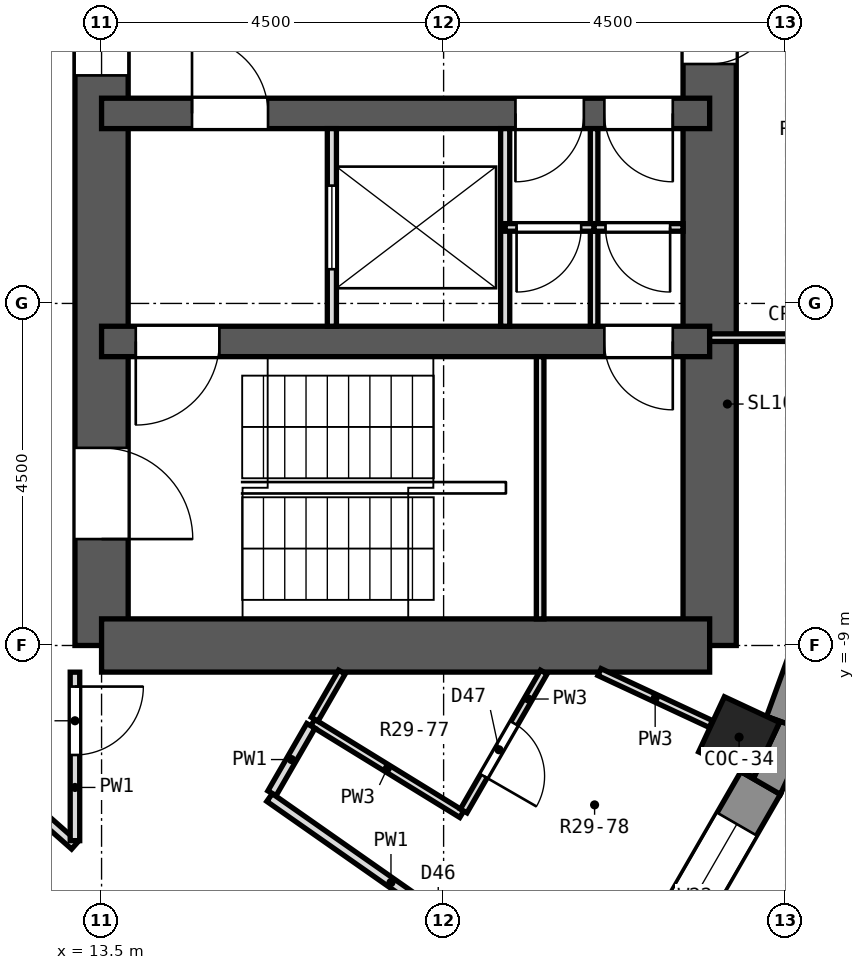
"""IFC4 building model, lengths in metres.
Left out: names, types, materials, properties, quantities, classifications, styles, units other than length and angle.
Written with IfcOpenShell. Run it as: python <this file> out.ifc"""

import sys

from ifc_helpers import new_model, si_unit, direction, frame, frame_2d, origin, origin_2d, place, context, subcontext, project, spatial, polyline, rectangle, outline, extrude, element, fill, save


model = new_model("IFC4")
c1 = context("Model", 3, precision=1e-05, world=origin(), true_north=direction((0.0, 1.0)))
c2 = subcontext(c1, "Body", "Model", "MODEL_VIEW")
j1 = project(units=[si_unit("LENGTHUNIT", "METRE"), si_unit("PLANEANGLEUNIT", "RADIAN")], contexts=[c1])
p1 = place(None, origin())
s1 = spatial("IfcSite", under=j1, at=p1, CompositionType="ELEMENT")
p2 = place(p1, origin())
s2 = spatial("IfcBuilding", under=s1, at=p2, CompositionType="ELEMENT")
p3 = place(p2, frame((0.0, 0.0, 200.4)))
s3 = spatial("IfcBuildingStorey", under=s2, at=p3, CompositionType="ELEMENT", Elevation=200.4)
p4 = place(p3, frame((21.887, -10.206, 0.0), z_axis=(0.0, 0.0, 1.0), x_axis=(0.906307787037, -0.422618261741, 0.0)))
e1 = element("IfcColumn", 1, at=p4, inside=s3, PredefinedType="COLUMN", context=c2, shape_type="SweptSolid", body=[
    extrude(rectangle(XDim=0.8, YDim=0.8, at=origin_2d()), origin(), (0.0, 0.0, 1.0), 3.3),
])
p5 = place(p3, frame((13.5, -9.0, 0.0), z_axis=(0.0, 0.0, 1.0), x_axis=(0.0, 1.0, 0.0)))
e2 = element("IfcWall", 2, at=p5, inside=s3, PredefinedType="SHEAR", context=c2, shape_type="SweptSolid", body=[
    extrude(rectangle(XDim=18.0, YDim=0.7, at=frame_2d((9.0, 0.0))), origin(), (0.0, 0.0, 1.0), 3.3),
])
p6 = place(p5, frame((15.4, 0.0, 0.0)))
e3 = element("IfcOpeningElement", 3, at=p6, cuts=e2, PredefinedType="OPENING", context=c2, shape_type="SweptSolid", body=[
    extrude(rectangle(XDim=1.2, YDim=2.1, at=frame_2d((0.6, 1.05))), frame((0.0, 0.362, 0.0), z_axis=(0.0, -1.0, 0.0), x_axis=(1.0, 0.0, 0.0)), (0.0, 0.0, 1.0), 0.724),
])
p7 = place(p5, frame((1.4, 0.0, 0.0)))
e4 = element("IfcOpeningElement", 4, at=p7, cuts=e2, PredefinedType="OPENING", context=c2, shape_type="SweptSolid", body=[
    extrude(rectangle(XDim=1.2, YDim=2.1, at=frame_2d((0.6, 1.05))), frame((0.0, 0.362, 0.0), z_axis=(0.0, -1.0, 0.0), x_axis=(1.0, 0.0, 0.0)), (0.0, 0.0, 1.0), 0.724),
])
p8 = place(p5, frame((7.5, 0.0, 0.0)))
e5 = element("IfcOpeningElement", 5, at=p8, cuts=e2, PredefinedType="OPENING", context=c2, shape_type="SweptSolid", body=[
    extrude(rectangle(XDim=3.0, YDim=2.4, at=frame_2d((1.5, 1.2))), frame((0.0, 0.362, 0.0), z_axis=(0.0, -1.0, 0.0), x_axis=(1.0, 0.0, 0.0)), (0.0, 0.0, 1.0), 0.724),
])
p9 = place(p3, frame((21.5, -9.0, 0.0), z_axis=(0.0, 0.0, 1.0), x_axis=(0.0, 1.0, 0.0)))
e6 = element("IfcWall", 6, at=p9, inside=s3, PredefinedType="SHEAR", context=c2, shape_type="SweptSolid", body=[
    extrude(rectangle(XDim=18.0, YDim=0.7, at=frame_2d((9.0, 0.0))), origin(), (0.0, 0.0, 1.0), 3.3),
])
p10 = place(p9, frame((9.45, 0.0, 0.0)))
e7 = element("IfcOpeningElement", 7, at=p10, cuts=e6, PredefinedType="OPENING", context=c2, shape_type="SweptSolid", body=[
    extrude(rectangle(XDim=0.9, YDim=2.1, at=frame_2d((0.45, 1.05))), frame((0.0, 0.362, 0.0), z_axis=(0.0, -1.0, 0.0), x_axis=(1.0, 0.0, 0.0)), (0.0, 0.0, 1.0), 0.724),
])
p11 = place(p9, frame((7.65, 0.0, 0.0)))
e8 = element("IfcOpeningElement", 8, at=p11, cuts=e6, PredefinedType="OPENING", context=c2, shape_type="SweptSolid", body=[
    extrude(rectangle(XDim=0.9, YDim=2.1, at=frame_2d((0.45, 1.05))), frame((0.0, 0.362, 0.0), z_axis=(0.0, -1.0, 0.0), x_axis=(1.0, 0.0, 0.0)), (0.0, 0.0, 1.0), 0.724),
])
p12 = place(p3, frame((13.5, -9.0, 0.0), z_axis=(0.0, 0.0, 1.0), x_axis=(1.0, 0.0, 0.0)))
e9 = element("IfcWall", 9, at=p12, inside=s3, PredefinedType="SHEAR", context=c2, shape_type="SweptSolid", body=[
    extrude(rectangle(XDim=8.0, YDim=0.7, at=frame_2d((4.0, 0.0))), origin(), (0.0, 0.0, 1.0), 3.3),
])
p13 = place(p3, frame((13.5, -5.0, 0.0), z_axis=(0.0, 0.0, 1.0), x_axis=(1.0, 0.0, 0.0)))
e10 = element("IfcWall", 10, at=p13, inside=s3, PredefinedType="SHEAR", context=c2, shape_type="SweptSolid", body=[
    extrude(rectangle(XDim=8.0, YDim=0.4, at=frame_2d((4.0, 0.0))), origin(), (0.0, 0.0, 1.0), 3.3),
])
p14 = place(p13, frame((6.615, 0.0, 0.0)))
e11 = element("IfcOpeningElement", 11, at=p14, cuts=e10, PredefinedType="OPENING", context=c2, shape_type="SweptSolid", body=[
    extrude(rectangle(XDim=0.9, YDim=2.1, at=frame_2d((0.45, 1.05))), frame((0.0, 0.212, 0.0), z_axis=(0.0, -1.0, 0.0), x_axis=(1.0, 0.0, 0.0)), (0.0, 0.0, 1.0), 0.424),
])
p15 = place(p13, frame((0.45, 0.0, 0.0)))
e12 = element("IfcOpeningElement", 12, at=p15, cuts=e10, PredefinedType="OPENING", context=c2, shape_type="SweptSolid", body=[
    extrude(rectangle(XDim=1.1, YDim=2.1, at=frame_2d((0.55, 1.05))), frame((0.0, 0.212, 0.0), z_axis=(0.0, -1.0, 0.0), x_axis=(1.0, 0.0, 0.0)), (0.0, 0.0, 1.0), 0.424),
])
p16 = place(p3, frame((13.5, -2.0, 0.0), z_axis=(0.0, 0.0, 1.0), x_axis=(1.0, 0.0, 0.0)))
e13 = element("IfcWall", 13, at=p16, inside=s3, PredefinedType="SHEAR", context=c2, shape_type="SweptSolid", body=[
    extrude(rectangle(XDim=8.0, YDim=0.4, at=frame_2d((4.0, 0.0))), origin(), (0.0, 0.0, 1.0), 3.3),
])
p17 = place(p16, frame((1.19, 0.0, 0.0)))
e14 = element("IfcOpeningElement", 14, at=p17, cuts=e13, PredefinedType="OPENING", context=c2, shape_type="SweptSolid", body=[
    extrude(rectangle(XDim=1.0, YDim=2.1, at=frame_2d((0.5, 1.05))), frame((0.0, 0.212, 0.0), z_axis=(0.0, -1.0, 0.0), x_axis=(1.0, 0.0, 0.0)), (0.0, 0.0, 1.0), 0.424),
])
p18 = place(p16, frame((5.445, 0.0, 0.0)))
e15 = element("IfcOpeningElement", 15, at=p18, cuts=e13, PredefinedType="OPENING", context=c2, shape_type="SweptSolid", body=[
    extrude(rectangle(XDim=0.9, YDim=2.1, at=frame_2d((0.45, 1.05))), frame((0.0, 0.212, 0.0), z_axis=(0.0, -1.0, 0.0), x_axis=(1.0, 0.0, 0.0)), (0.0, 0.0, 1.0), 0.424),
])
p19 = place(p16, frame((6.615, 0.0, 0.0)))
e16 = element("IfcOpeningElement", 16, at=p19, cuts=e13, PredefinedType="OPENING", context=c2, shape_type="SweptSolid", body=[
    extrude(rectangle(XDim=0.9, YDim=2.1, at=frame_2d((0.45, 1.05))), frame((0.0, 0.212, 0.0), z_axis=(0.0, -1.0, 0.0), x_axis=(1.0, 0.0, 0.0)), (0.0, 0.0, 1.0), 0.424),
])
p20 = place(p3, frame((20.446, -13.796, 0.0), z_axis=(0.0, 0.0, 1.0), x_axis=(0.499998129301, 0.86602648383, 0.0)))
e17 = element("IfcWall", 17, at=p20, inside=s3, PredefinedType="SOLIDWALL", context=c2, shape_type="SweptSolid", body=[
    extrude(rectangle(XDim=3.45, YDim=0.6, at=frame_2d((1.725, 0.0))), origin(), (0.0, 0.0, 1.0), 2.85),
])
p21 = place(p20, frame((0.625, 0.0, 0.9)))
e18 = element("IfcOpeningElement", 18, at=p21, cuts=e17, PredefinedType="OPENING", context=c2, shape_type="SweptSolid", body=[
    extrude(rectangle(XDim=2.2, YDim=1.8, at=frame_2d((1.1, 0.9))), frame((0.0, 0.312, 0.0), z_axis=(0.0, -1.0, 0.0), x_axis=(1.0, 0.0, 0.0)), (0.0, 0.0, 1.0), 0.624),
])
p22 = place(p3, frame((22.531, -10.036, 0.0), z_axis=(0.0, 0.0, 1.0), x_axis=(0.342032843455, 0.93968799822, 0.0)))
e19 = element("IfcWall", 19, at=p22, inside=s3, PredefinedType="SOLIDWALL", context=c2, shape_type="SweptSolid", body=[
    extrude(rectangle(XDim=3.45, YDim=0.6, at=frame_2d((1.725, 0.0))), origin(), (0.0, 0.0, 1.0), 2.85),
])
p23 = place(p3, origin())
e20 = element("IfcWall", 20, at=p23, inside=s3, PredefinedType="SOLIDWALL", context=c2, shape_type="SweptSolid", body=[
    extrude(outline(polyline([(22.813, -10.139), (22.249, -9.934), (22.419, -10.013), (22.081, -10.738), (21.911, -10.659), (22.431, -10.959), (22.813, -10.139)])), origin(), (0.0, 0.0, 1.0), 2.85),
])
p24 = place(p3, frame((6.418, -5.682, 0.0), z_axis=(0.0, 0.0, 1.0), x_axis=(0.749233096006, -0.662306400278, 0.0)))
e21 = element("IfcWall", 21, at=p24, inside=s3, PredefinedType="PARTITIONING", context=c2, shape_type="SweptSolid", body=[
    extrude(rectangle(XDim=8.982, YDim=0.125, at=frame_2d((4.491, 0.0))), origin(), (0.0, 0.0, 1.0), 2.85),
])
p25 = place(p3, frame((15.71, -11.0, 0.0), z_axis=(0.0, 0.0, 1.0), x_axis=(0.819118758933, -0.57362396983, 0.0)))
e22 = element("IfcWall", 22, at=p25, inside=s3, PredefinedType="PARTITIONING", context=c2, shape_type="SweptSolid", body=[
    extrude(rectangle(XDim=4.562, YDim=0.125, at=frame_2d((2.281, 0.0))), origin(), (0.0, 0.0, 1.0), 2.85),
])
p26 = place(p25, frame((2.259, 0.0, 0.0)))
e23 = element("IfcOpeningElement", 23, at=p26, cuts=e22, PredefinedType="OPENING", context=c2, shape_type="SweptSolid", body=[
    extrude(rectangle(XDim=0.9, YDim=2.1, at=frame_2d((0.45, 1.05))), frame((0.0, 0.074, 0.0), z_axis=(0.0, -1.0, 0.0), x_axis=(1.0, 0.0, 0.0)), (0.0, 0.0, 1.0), 0.149),
])
p27 = place(p3, frame((16.279, -10.014, 0.0), z_axis=(0.0, 0.0, 1.0), x_axis=(0.851672886374, -0.524073749214, 0.0)))
e24 = element("IfcWall", 24, at=p27, inside=s3, PredefinedType="PARTITIONING", context=c2, shape_type="SweptSolid", body=[
    extrude(rectangle(XDim=2.301, YDim=0.1, at=frame_2d((1.151, 0.0))), origin(), (0.0, 0.0, 1.0), 2.85),
])
p28 = place(p3, frame((20.051, -9.35, 0.0), z_axis=(0.0, 0.0, 1.0), x_axis=(0.906329754533, -0.422571149096, 0.0)))
e25 = element("IfcWall", 25, at=p28, inside=s3, PredefinedType="PARTITIONING", context=c2, shape_type="SweptSolid", body=[
    extrude(rectangle(XDim=1.616, YDim=0.1, at=frame_2d((0.808, 0.0))), origin(), (0.0, 0.0, 1.0), 2.85),
])
p29 = place(p3, frame((18.264, -11.177, 0.0), z_axis=(0.0, 0.0, 1.0), x_axis=(0.499849385254, 0.866112343787, 0.0)))
e26 = element("IfcWall", 26, at=p29, inside=s3, PredefinedType="PARTITIONING", context=c2, shape_type="SweptSolid", body=[
    extrude(rectangle(XDim=2.109, YDim=0.1, at=frame_2d((1.055, 0.0))), origin(), (0.0, 0.0, 1.0), 2.85),
])
p30 = place(p29, frame((0.53, 0.0, 0.0)))
e27 = element("IfcOpeningElement", 27, at=p30, cuts=e26, PredefinedType="OPENING", context=c2, shape_type="SweptSolid", body=[
    extrude(rectangle(XDim=0.8, YDim=2.1, at=frame_2d((0.4, 1.05))), frame((0.0, 0.062, 0.0), z_axis=(0.0, -1.0, 0.0), x_axis=(1.0, 0.0, 0.0)), (0.0, 0.0, 1.0), 0.124),
])
p31 = place(p3, frame((16.304, -9.971, 0.0), z_axis=(0.0, 0.0, 1.0), x_axis=(0.499840435016, 0.866117509073, 0.0)))
e28 = element("IfcWall", 28, at=p31, inside=s3, PredefinedType="PARTITIONING", context=c2, shape_type="SweptSolid", body=[
    extrude(rectangle(XDim=0.717, YDim=0.1, at=frame_2d((0.358, 0.0))), origin(), (0.0, 0.0, 1.0), 2.85),
])
p32 = place(p3, frame((15.742, -10.944, 0.0), z_axis=(0.0, 0.0, 1.0), x_axis=(0.499832553123, 0.866122057702, 0.0)))
e29 = element("IfcWall", 29, at=p32, inside=s3, PredefinedType="PARTITIONING", context=c2, shape_type="SweptSolid", body=[
    extrude(rectangle(XDim=1.024, YDim=0.125, at=frame_2d((0.512, 0.0))), origin(), (0.0, 0.0, 1.0), 2.85),
])
p33 = place(p3, frame((13.15, -11.567, 0.0), z_axis=(0.0, 0.0, 1.0), x_axis=(0.0, 1.0, 0.0)))
e30 = element("IfcWall", 30, at=p33, inside=s3, PredefinedType="PARTITIONING", context=c2, shape_type="SweptSolid", body=[
    extrude(rectangle(XDim=2.216, YDim=0.125, at=frame_2d((1.108, 0.0))), origin(), (0.0, 0.0, 1.0), 2.85),
])
p34 = place(p33, frame((1.127, 0.0, 0.0)))
e31 = element("IfcOpeningElement", 31, at=p34, cuts=e30, PredefinedType="OPENING", context=c2, shape_type="SweptSolid", body=[
    extrude(rectangle(XDim=0.9, YDim=2.1, at=frame_2d((0.45, 1.05))), frame((0.0, 0.074, 0.0), z_axis=(0.0, -1.0, 0.0), x_axis=(1.0, 0.0, 0.0)), (0.0, 0.0, 1.0), 0.149),
])
p35 = place(p3, frame((21.5, -4.95, 0.0), z_axis=(0.0, 0.0, 1.0), x_axis=(1.0, 0.0, 0.0)))
e32 = element("IfcWall", 32, at=p35, inside=s3, PredefinedType="PARTITIONING", context=c2, shape_type="SweptSolid", body=[
    extrude(rectangle(XDim=2.307, YDim=0.1, at=frame_2d((1.153, 0.0))), origin(), (0.0, 0.0, 1.0), 2.85),
])
p36 = place(p3, frame((16.53, -4.8, 0.0), z_axis=(0.0, 0.0, 1.0), x_axis=(0.0, 1.0, 0.0)))
e33 = element("IfcWall", 33, at=p36, inside=s3, PredefinedType="PARTITIONING", context=c2, shape_type="SweptSolid", body=[
    extrude(rectangle(XDim=2.6, YDim=0.12, at=frame_2d((1.3, 0.0))), origin(), (0.0, 0.0, 1.0), 2.85),
])
p37 = place(p36, frame((0.75, 0.0, 0.0)))
e34 = element("IfcOpeningElement", 34, at=p37, cuts=e33, PredefinedType="OPENING", context=c2, shape_type="SweptSolid", body=[
    extrude(rectangle(XDim=1.1, YDim=2.1, at=frame_2d((0.55, 1.05))), frame((0.0, 0.072, 0.0), z_axis=(0.0, -1.0, 0.0), x_axis=(1.0, 0.0, 0.0)), (0.0, 0.0, 1.0), 0.144),
])
p38 = place(p3, frame((18.81, -4.8, 0.0), z_axis=(0.0, 0.0, 1.0), x_axis=(0.0, 1.0, 0.0)))
e35 = element("IfcWall", 35, at=p38, inside=s3, PredefinedType="PARTITIONING", context=c2, shape_type="SweptSolid", body=[
    extrude(rectangle(XDim=2.6, YDim=0.12, at=frame_2d((1.3, 0.0))), origin(), (0.0, 0.0, 1.0), 2.85),
])
p39 = place(p3, frame((19.98, -4.8, 0.0), z_axis=(0.0, 0.0, 1.0), x_axis=(0.0, 1.0, 0.0)))
e36 = element("IfcWall", 36, at=p39, inside=s3, PredefinedType="PARTITIONING", context=c2, shape_type="SweptSolid", body=[
    extrude(rectangle(XDim=2.6, YDim=0.1, at=frame_2d((1.3, 0.0))), origin(), (0.0, 0.0, 1.0), 2.85),
])
p40 = place(p3, frame((18.81, -3.5, 0.0), z_axis=(0.0, 0.0, 1.0), x_axis=(1.0, 0.0, 0.0)))
e37 = element("IfcWall", 37, at=p40, inside=s3, PredefinedType="PARTITIONING", context=c2, shape_type="SweptSolid", body=[
    extrude(rectangle(XDim=1.17, YDim=0.1, at=frame_2d((0.585, 0.0))), origin(), (0.0, 0.0, 1.0), 2.85),
])
p41 = place(p40, frame((0.15, 0.0, 0.0)))
e38 = element("IfcOpeningElement", 38, at=p41, cuts=e37, PredefinedType="OPENING", context=c2, shape_type="SweptSolid", body=[
    extrude(rectangle(XDim=0.85, YDim=2.1, at=frame_2d((0.425, 1.05))), frame((0.0, 0.062, 0.0), z_axis=(0.0, -1.0, 0.0), x_axis=(1.0, 0.0, 0.0)), (0.0, 0.0, 1.0), 0.124),
])
p42 = place(p3, frame((19.98, -3.5, 0.0), z_axis=(0.0, 0.0, 1.0), x_axis=(1.0, 0.0, 0.0)))
e39 = element("IfcWall", 39, at=p42, inside=s3, PredefinedType="PARTITIONING", context=c2, shape_type="SweptSolid", body=[
    extrude(rectangle(XDim=1.17, YDim=0.1, at=frame_2d((0.585, 0.0))), origin(), (0.0, 0.0, 1.0), 2.85),
])
p43 = place(p42, frame((0.15, 0.0, 0.0)))
e40 = element("IfcOpeningElement", 40, at=p43, cuts=e39, PredefinedType="OPENING", context=c2, shape_type="SweptSolid", body=[
    extrude(rectangle(XDim=0.85, YDim=2.1, at=frame_2d((0.425, 1.05))), frame((0.0, 0.062, 0.0), z_axis=(0.0, -1.0, 0.0), x_axis=(1.0, 0.0, 0.0)), (0.0, 0.0, 1.0), 0.124),
])
p44 = place(p3, frame((19.27, -8.65, 0.0), z_axis=(0.0, 0.0, 1.0), x_axis=(0.0, 1.0, 0.0)))
e41 = element("IfcWall", 41, at=p44, inside=s3, PredefinedType="PARTITIONING", context=c2, shape_type="SweptSolid", body=[
    extrude(rectangle(XDim=3.45, YDim=0.1, at=frame_2d((1.725, 0.0))), origin(), (0.0, 0.0, 1.0), 2.85),
])
p45 = place(p21, origin())
e42 = element("IfcWindow", 42, at=p45, inside=s3, PartitioningType="SINGLE_PANEL", PredefinedType="WINDOW", context=c2, shape_type="SweptSolid", body=[
    extrude(rectangle(XDim=2.2, YDim=1.8, at=frame_2d((1.1, 0.9))), frame((0.0, 0.18, 0.0), z_axis=(0.0, -1.0, 0.0), x_axis=(1.0, 0.0, 0.0)), (0.0, 0.0, 1.0), 0.06),
])
fill(e18, e42)
p46 = place(p34, frame((0.9, 0.0, 0.0), z_axis=(0.0, 0.0, 1.0), x_axis=(-1.0, 0.0, 0.0)))
e43 = element("IfcDoor", 43, at=p46, inside=s3, OperationType="SINGLE_SWING_LEFT", PredefinedType="DOOR", context=c2, shape_type="SweptSolid", body=[
    extrude(rectangle(XDim=0.9, YDim=2.1, at=frame_2d((0.45, 1.05))), frame((0.0, 0.025, 0.0), z_axis=(0.0, -1.0, 0.0), x_axis=(1.0, 0.0, 0.0)), (0.0, 0.0, 1.0), 0.05),
])
fill(e31, e43)
p47 = place(p30, frame((0.8, 0.0, 0.0), z_axis=(0.0, 0.0, 1.0), x_axis=(-1.0, 0.0, 0.0)))
e44 = element("IfcDoor", 44, at=p47, inside=s3, OperationType="SINGLE_SWING_RIGHT", PredefinedType="DOOR", context=c2, shape_type="SweptSolid", body=[
    extrude(rectangle(XDim=0.8, YDim=2.1, at=frame_2d((0.4, 1.05))), frame((0.0, 0.025, 0.0), z_axis=(0.0, -1.0, 0.0), x_axis=(1.0, 0.0, 0.0)), (0.0, 0.0, 1.0), 0.05),
])
fill(e27, e44)
p48 = place(p37, origin())
e45 = element("IfcDoor", 45, at=p48, inside=s3, OperationType="DOUBLE_DOOR_SLIDING", PredefinedType="DOOR", context=c2, shape_type="SweptSolid", body=[
    extrude(rectangle(XDim=1.1, YDim=2.1, at=frame_2d((0.55, 1.05))), frame((0.0, 0.025, 0.0), z_axis=(0.0, -1.0, 0.0), x_axis=(1.0, 0.0, 0.0)), (0.0, 0.0, 1.0), 0.05),
])
fill(e34, e45)
p49 = place(p17, origin())
e46 = element("IfcDoor", 46, at=p49, inside=s3, OperationType="SINGLE_SWING_LEFT", PredefinedType="DOOR", context=c2, shape_type="SweptSolid", body=[
    extrude(rectangle(XDim=1.0, YDim=2.1, at=frame_2d((0.5, 1.05))), frame((0.0, 0.025, 0.0), z_axis=(0.0, -1.0, 0.0), x_axis=(1.0, 0.0, 0.0)), (0.0, 0.0, 1.0), 0.05),
])
fill(e14, e46)
p50 = place(p18, frame((0.9, 0.0, 0.0), z_axis=(0.0, 0.0, 1.0), x_axis=(-1.0, 0.0, 0.0)))
e47 = element("IfcDoor", 47, at=p50, inside=s3, OperationType="SINGLE_SWING_RIGHT", PredefinedType="DOOR", context=c2, shape_type="SweptSolid", body=[
    extrude(rectangle(XDim=0.9, YDim=2.1, at=frame_2d((0.45, 1.05))), frame((0.0, 0.025, 0.0), z_axis=(0.0, -1.0, 0.0), x_axis=(1.0, 0.0, 0.0)), (0.0, 0.0, 1.0), 0.05),
])
fill(e15, e47)
p51 = place(p19, frame((0.9, 0.0, 0.0), z_axis=(0.0, 0.0, 1.0), x_axis=(-1.0, 0.0, 0.0)))
e48 = element("IfcDoor", 48, at=p51, inside=s3, OperationType="SINGLE_SWING_LEFT", PredefinedType="DOOR", context=c2, shape_type="SweptSolid", body=[
    extrude(rectangle(XDim=0.9, YDim=2.1, at=frame_2d((0.45, 1.05))), frame((0.0, 0.025, 0.0), z_axis=(0.0, -1.0, 0.0), x_axis=(1.0, 0.0, 0.0)), (0.0, 0.0, 1.0), 0.05),
])
fill(e16, e48)
p52 = place(p11, frame((0.9, 0.0, 0.0), z_axis=(0.0, 0.0, 1.0), x_axis=(-1.0, 0.0, 0.0)))
e49 = element("IfcDoor", 49, at=p52, inside=s3, OperationType="SINGLE_SWING_LEFT", PredefinedType="DOOR", context=c2, shape_type="SweptSolid", body=[
    extrude(rectangle(XDim=0.9, YDim=2.1, at=frame_2d((0.45, 1.05))), frame((0.0, 0.025, 0.0), z_axis=(0.0, -1.0, 0.0), x_axis=(1.0, 0.0, 0.0)), (0.0, 0.0, 1.0), 0.05),
])
fill(e8, e49)
p53 = place(p41, frame((0.85, 0.0, 0.0), z_axis=(0.0, 0.0, 1.0), x_axis=(-1.0, 0.0, 0.0)))
e50 = element("IfcDoor", 50, at=p53, inside=s3, OperationType="SINGLE_SWING_RIGHT", PredefinedType="DOOR", context=c2, shape_type="SweptSolid", body=[
    extrude(rectangle(XDim=0.85, YDim=2.1, at=frame_2d((0.425, 1.05))), frame((0.0, 0.025, 0.0), z_axis=(0.0, -1.0, 0.0), x_axis=(1.0, 0.0, 0.0)), (0.0, 0.0, 1.0), 0.05),
])
fill(e38, e50)
p54 = place(p43, frame((0.85, 0.0, 0.0), z_axis=(0.0, 0.0, 1.0), x_axis=(-1.0, 0.0, 0.0)))
e51 = element("IfcDoor", 51, at=p54, inside=s3, OperationType="SINGLE_SWING_LEFT", PredefinedType="DOOR", context=c2, shape_type="SweptSolid", body=[
    extrude(rectangle(XDim=0.85, YDim=2.1, at=frame_2d((0.425, 1.05))), frame((0.0, 0.025, 0.0), z_axis=(0.0, -1.0, 0.0), x_axis=(1.0, 0.0, 0.0)), (0.0, 0.0, 1.0), 0.05),
])
fill(e40, e51)
p55 = place(p14, frame((0.9, 0.0, 0.0), z_axis=(0.0, 0.0, 1.0), x_axis=(-1.0, 0.0, 0.0)))
e52 = element("IfcDoor", 52, at=p55, inside=s3, OperationType="SINGLE_SWING_LEFT", PredefinedType="DOOR", context=c2, shape_type="SweptSolid", body=[
    extrude(rectangle(XDim=0.9, YDim=2.1, at=frame_2d((0.45, 1.05))), frame((0.0, 0.025, 0.0), z_axis=(0.0, -1.0, 0.0), x_axis=(1.0, 0.0, 0.0)), (0.0, 0.0, 1.0), 0.05),
])
fill(e11, e52)
p56 = place(p15, frame((1.1, 0.0, 0.0), z_axis=(0.0, 0.0, 1.0), x_axis=(-1.0, 0.0, 0.0)))
e53 = element("IfcDoor", 53, at=p56, inside=s3, OperationType="SINGLE_SWING_RIGHT", PredefinedType="DOOR", context=c2, shape_type="SweptSolid", body=[
    extrude(rectangle(XDim=1.1, YDim=2.1, at=frame_2d((0.55, 1.05))), frame((0.0, 0.025, 0.0), z_axis=(0.0, -1.0, 0.0), x_axis=(1.0, 0.0, 0.0)), (0.0, 0.0, 1.0), 0.05),
])
fill(e12, e53)
p57 = place(p7, frame((1.2, 0.0, 0.0), z_axis=(0.0, 0.0, 1.0), x_axis=(-1.0, 0.0, 0.0)))
e54 = element("IfcDoor", 54, at=p57, inside=s3, OperationType="SINGLE_SWING_RIGHT", PredefinedType="DOOR", context=c2, shape_type="SweptSolid", body=[
    extrude(rectangle(XDim=1.2, YDim=2.1, at=frame_2d((0.6, 1.05))), frame((0.0, 0.025, 0.0), z_axis=(0.0, -1.0, 0.0), x_axis=(1.0, 0.0, 0.0)), (0.0, 0.0, 1.0), 0.05),
])
fill(e4, e54)
p58 = place(p8, origin())
e55 = element("IfcDoor", 55, at=p58, inside=s3, OperationType="DOUBLE_DOOR_SLIDING", PredefinedType="DOOR", context=c2, shape_type="SweptSolid", body=[
    extrude(rectangle(XDim=3.0, YDim=2.4, at=frame_2d((1.5, 1.2))), frame((0.0, 0.025, 0.0), z_axis=(0.0, -1.0, 0.0), x_axis=(1.0, 0.0, 0.0)), (0.0, 0.0, 1.0), 0.05),
])
fill(e5, e55)
save(model, sys.argv[1])
